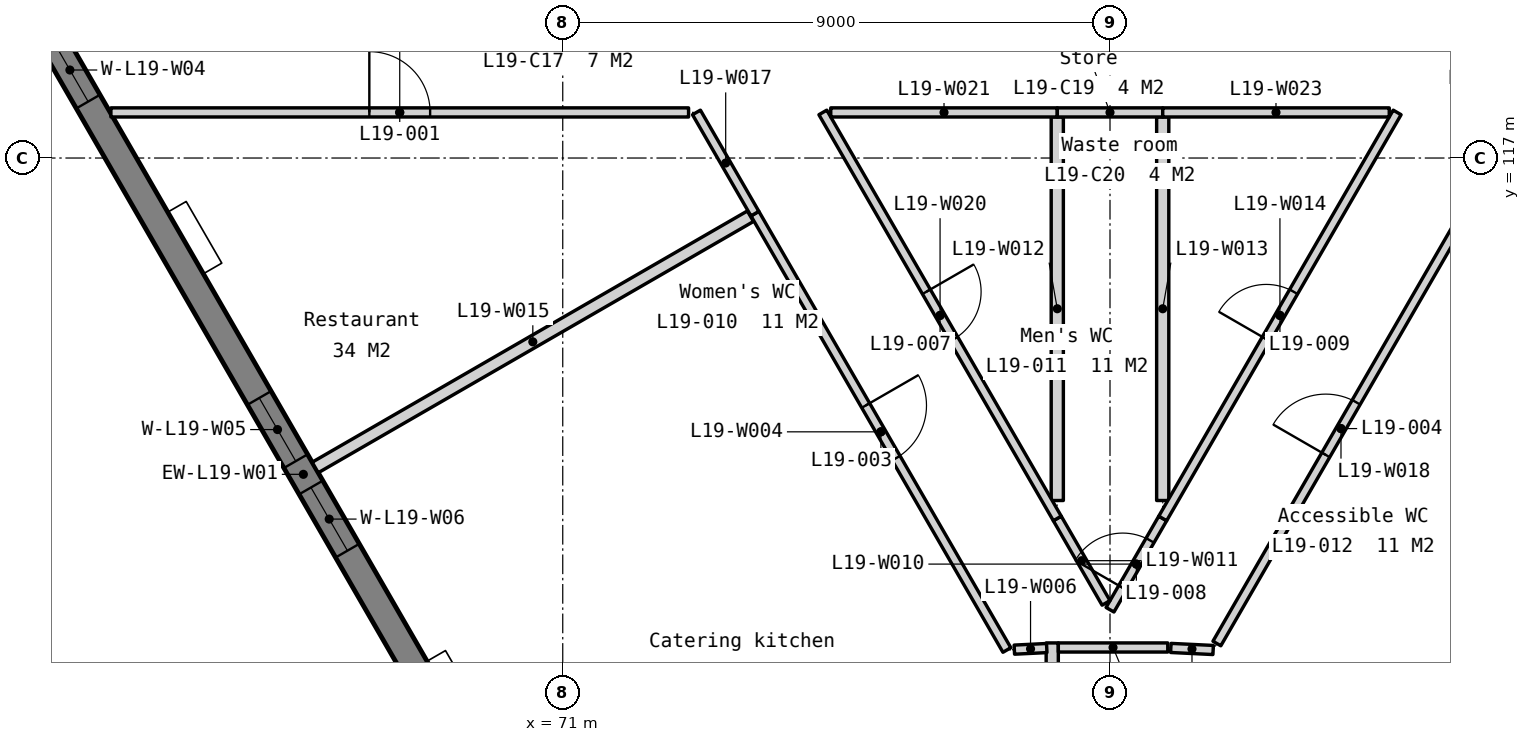
"""IFC4 building model, lengths in metres.
Left out: names, types, materials, properties, quantities, classifications, styles, units other than length and angle.
Written with IfcOpenShell. Run it as: python <this file> out.ifc"""

import sys

from ifc_helpers import new_model, si_unit, direction, frame, frame_2d, origin, place, context, subcontext, project, spatial, polyline, rectangle, outline, extrude, element, fill, save


model = new_model("IFC4")
c1 = context("Model", 3, precision=1e-05, world=origin(), true_north=direction((0.0, 1.0)))
c2 = subcontext(c1, "Body", "Model", "MODEL_VIEW")
j1 = project(units=[si_unit("LENGTHUNIT", "METRE"), si_unit("PLANEANGLEUNIT", "RADIAN")], contexts=[c1])
p1 = place(None, origin())
s1 = spatial("IfcSite", under=j1, at=p1, CompositionType="ELEMENT")
p2 = place(p1, origin())
s2 = spatial("IfcBuilding", under=s1, at=p2, CompositionType="ELEMENT")
p3 = place(p2, frame((0.0, 0.0, 81.8)))
s3 = spatial("IfcBuildingStorey", under=s2, at=p3, CompositionType="ELEMENT", Elevation=81.8)
p4 = place(p3, frame((56.073, 130.263, -0.45), z_axis=(0.0, 0.0, 1.0), x_axis=(0.500000478905, -0.866025127289, 0.0)))
e1 = element("IfcWall", 1, at=p4, inside=s3, PredefinedType="SOLIDWALL", context=c2, shape_type="SweptSolid", body=[
    extrude(outline(polyline([(42.643, 0.0), (42.643, 3.8), (0.0, 3.8), (0.0, 0.0), (42.643, 0.0)])), frame((0.0, 0.225, 0.0), z_axis=(0.0, -1.0, 0.0), x_axis=(1.0, 0.0, 0.0)), (0.0, 0.0, 1.0), 0.45),
])
p5 = place(p4, frame((2.814, 0.0, 1.35)))
e2 = element("IfcOpeningElement", 2, at=p5, cuts=e1, PredefinedType="OPENING", context=c2, shape_type="SweptSolid", body=[
    extrude(rectangle(XDim=1.2, YDim=1.5, at=frame_2d((0.6, 0.75))), frame((0.0, 0.235, 0.0), z_axis=(0.0, -1.0, 0.0), x_axis=(1.0, 0.0, 0.0)), (0.0, 0.0, 1.0), 0.47),
])
p6 = place(p4, frame((4.514, 0.0, 1.35)))
e3 = element("IfcOpeningElement", 3, at=p6, cuts=e1, PredefinedType="OPENING", context=c2, shape_type="SweptSolid", body=[
    extrude(rectangle(XDim=1.2, YDim=1.5, at=frame_2d((0.6, 0.75))), frame((0.0, 0.235, 0.0), z_axis=(0.0, -1.0, 0.0), x_axis=(1.0, 0.0, 0.0)), (0.0, 0.0, 1.0), 0.47),
])
p7 = place(p4, frame((11.343, 0.0, 1.35)))
e4 = element("IfcOpeningElement", 4, at=p7, cuts=e1, PredefinedType="OPENING", context=c2, shape_type="SweptSolid", body=[
    extrude(rectangle(XDim=1.2, YDim=1.5, at=frame_2d((0.6, 0.75))), frame((0.0, 0.235, 0.0), z_axis=(0.0, -1.0, 0.0), x_axis=(1.0, 0.0, 0.0)), (0.0, 0.0, 1.0), 0.47),
])
p8 = place(p4, frame((13.043, 0.0, 1.35)))
e5 = element("IfcOpeningElement", 5, at=p8, cuts=e1, PredefinedType="OPENING", context=c2, shape_type="SweptSolid", body=[
    extrude(rectangle(XDim=1.2, YDim=1.5, at=frame_2d((0.6, 0.75))), frame((0.0, 0.235, 0.0), z_axis=(0.0, -1.0, 0.0), x_axis=(1.0, 0.0, 0.0)), (0.0, 0.0, 1.0), 0.47),
])
p9 = place(p4, frame((19.872, 0.0, 1.35)))
e6 = element("IfcOpeningElement", 6, at=p9, cuts=e1, PredefinedType="OPENING", context=c2, shape_type="SweptSolid", body=[
    extrude(rectangle(XDim=1.2, YDim=1.5, at=frame_2d((0.6, 0.75))), frame((0.0, 0.235, 0.0), z_axis=(0.0, -1.0, 0.0), x_axis=(1.0, 0.0, 0.0)), (0.0, 0.0, 1.0), 0.47),
])
p10 = place(p4, frame((21.572, 0.0, 1.35)))
e7 = element("IfcOpeningElement", 7, at=p10, cuts=e1, PredefinedType="OPENING", context=c2, shape_type="SweptSolid", body=[
    extrude(rectangle(XDim=1.2, YDim=1.5, at=frame_2d((0.6, 0.75))), frame((0.0, 0.235, 0.0), z_axis=(0.0, -1.0, 0.0), x_axis=(1.0, 0.0, 0.0)), (0.0, 0.0, 1.0), 0.47),
])
p11 = place(p4, frame((28.4, 0.0, 1.35)))
e8 = element("IfcOpeningElement", 8, at=p11, cuts=e1, PredefinedType="OPENING", context=c2, shape_type="SweptSolid", body=[
    extrude(rectangle(XDim=1.2, YDim=1.5, at=frame_2d((0.6, 0.75))), frame((0.0, 0.235, 0.0), z_axis=(0.0, -1.0, 0.0), x_axis=(1.0, 0.0, 0.0)), (0.0, 0.0, 1.0), 0.47),
])
p12 = place(p4, frame((30.1, 0.0, 1.35)))
e9 = element("IfcOpeningElement", 9, at=p12, cuts=e1, PredefinedType="OPENING", context=c2, shape_type="SweptSolid", body=[
    extrude(rectangle(XDim=1.2, YDim=1.5, at=frame_2d((0.6, 0.75))), frame((0.0, 0.235, 0.0), z_axis=(0.0, -1.0, 0.0), x_axis=(1.0, 0.0, 0.0)), (0.0, 0.0, 1.0), 0.47),
])
p13 = place(p4, frame((36.929, 0.0, 1.35)))
e10 = element("IfcOpeningElement", 10, at=p13, cuts=e1, PredefinedType="OPENING", context=c2, shape_type="SweptSolid", body=[
    extrude(rectangle(XDim=1.2, YDim=1.5, at=frame_2d((0.6, 0.75))), frame((0.0, 0.235, 0.0), z_axis=(0.0, -1.0, 0.0), x_axis=(1.0, 0.0, 0.0)), (0.0, 0.0, 1.0), 0.47),
])
p14 = place(p4, frame((38.629, 0.0, 1.35)))
e11 = element("IfcOpeningElement", 11, at=p14, cuts=e1, PredefinedType="OPENING", context=c2, shape_type="SweptSolid", body=[
    extrude(rectangle(XDim=1.2, YDim=1.5, at=frame_2d((0.6, 0.75))), frame((0.0, 0.235, 0.0), z_axis=(0.0, -1.0, 0.0), x_axis=(1.0, 0.0, 0.0)), (0.0, 0.0, 1.0), 0.47),
])
p15 = place(p3, frame((82.605, 93.333, -0.45), z_axis=(0.0, 0.0, 1.0), x_axis=(0.500000478905, 0.866025127289, 0.0)))
e12 = element("IfcWall", 12, at=p15, inside=s3, PredefinedType="SOLIDWALL", context=c2, shape_type="SweptSolid", body=[
    extrude(outline(polyline([(42.643, 0.0), (42.643, 3.8), (0.0, 3.8), (0.0, 0.0), (42.643, 0.0)])), frame((0.0, 0.225, 0.0), z_axis=(0.0, -1.0, 0.0), x_axis=(1.0, 0.0, 0.0)), (0.0, 0.0, 1.0), 0.45),
])
p16 = place(p15, frame((2.814, 0.0, 1.35)))
e13 = element("IfcOpeningElement", 13, at=p16, cuts=e12, PredefinedType="OPENING", context=c2, shape_type="SweptSolid", body=[
    extrude(rectangle(XDim=1.2, YDim=1.5, at=frame_2d((0.6, 0.75))), frame((0.0, 0.235, 0.0), z_axis=(0.0, -1.0, 0.0), x_axis=(1.0, 0.0, 0.0)), (0.0, 0.0, 1.0), 0.47),
])
p17 = place(p15, frame((4.514, 0.0, 1.35)))
e14 = element("IfcOpeningElement", 14, at=p17, cuts=e12, PredefinedType="OPENING", context=c2, shape_type="SweptSolid", body=[
    extrude(rectangle(XDim=1.2, YDim=1.5, at=frame_2d((0.6, 0.75))), frame((0.0, 0.235, 0.0), z_axis=(0.0, -1.0, 0.0), x_axis=(1.0, 0.0, 0.0)), (0.0, 0.0, 1.0), 0.47),
])
p18 = place(p15, frame((11.343, 0.0, 1.35)))
e15 = element("IfcOpeningElement", 15, at=p18, cuts=e12, PredefinedType="OPENING", context=c2, shape_type="SweptSolid", body=[
    extrude(rectangle(XDim=1.2, YDim=1.5, at=frame_2d((0.6, 0.75))), frame((0.0, 0.235, 0.0), z_axis=(0.0, -1.0, 0.0), x_axis=(1.0, 0.0, 0.0)), (0.0, 0.0, 1.0), 0.47),
])
p19 = place(p15, frame((13.043, 0.0, 1.35)))
e16 = element("IfcOpeningElement", 16, at=p19, cuts=e12, PredefinedType="OPENING", context=c2, shape_type="SweptSolid", body=[
    extrude(rectangle(XDim=1.2, YDim=1.5, at=frame_2d((0.6, 0.75))), frame((0.0, 0.235, 0.0), z_axis=(0.0, -1.0, 0.0), x_axis=(1.0, 0.0, 0.0)), (0.0, 0.0, 1.0), 0.47),
])
p20 = place(p15, frame((19.872, 0.0, 1.35)))
e17 = element("IfcOpeningElement", 17, at=p20, cuts=e12, PredefinedType="OPENING", context=c2, shape_type="SweptSolid", body=[
    extrude(rectangle(XDim=1.2, YDim=1.5, at=frame_2d((0.6, 0.75))), frame((0.0, 0.235, 0.0), z_axis=(0.0, -1.0, 0.0), x_axis=(1.0, 0.0, 0.0)), (0.0, 0.0, 1.0), 0.47),
])
p21 = place(p15, frame((21.572, 0.0, 1.35)))
e18 = element("IfcOpeningElement", 18, at=p21, cuts=e12, PredefinedType="OPENING", context=c2, shape_type="SweptSolid", body=[
    extrude(rectangle(XDim=1.2, YDim=1.5, at=frame_2d((0.6, 0.75))), frame((0.0, 0.235, 0.0), z_axis=(0.0, -1.0, 0.0), x_axis=(1.0, 0.0, 0.0)), (0.0, 0.0, 1.0), 0.47),
])
p22 = place(p15, frame((28.4, 0.0, 1.35)))
e19 = element("IfcOpeningElement", 19, at=p22, cuts=e12, PredefinedType="OPENING", context=c2, shape_type="SweptSolid", body=[
    extrude(rectangle(XDim=1.2, YDim=1.5, at=frame_2d((0.6, 0.75))), frame((0.0, 0.235, 0.0), z_axis=(0.0, -1.0, 0.0), x_axis=(1.0, 0.0, 0.0)), (0.0, 0.0, 1.0), 0.47),
])
p23 = place(p15, frame((30.1, 0.0, 1.35)))
e20 = element("IfcOpeningElement", 20, at=p23, cuts=e12, PredefinedType="OPENING", context=c2, shape_type="SweptSolid", body=[
    extrude(rectangle(XDim=1.2, YDim=1.5, at=frame_2d((0.6, 0.75))), frame((0.0, 0.235, 0.0), z_axis=(0.0, -1.0, 0.0), x_axis=(1.0, 0.0, 0.0)), (0.0, 0.0, 1.0), 0.47),
])
p24 = place(p15, frame((36.929, 0.0, 1.35)))
e21 = element("IfcOpeningElement", 21, at=p24, cuts=e12, PredefinedType="OPENING", context=c2, shape_type="SweptSolid", body=[
    extrude(rectangle(XDim=1.2, YDim=1.5, at=frame_2d((0.6, 0.75))), frame((0.0, 0.235, 0.0), z_axis=(0.0, -1.0, 0.0), x_axis=(1.0, 0.0, 0.0)), (0.0, 0.0, 1.0), 0.47),
])
p25 = place(p15, frame((38.629, 0.0, 1.35)))
e22 = element("IfcOpeningElement", 22, at=p25, cuts=e12, PredefinedType="OPENING", context=c2, shape_type="SweptSolid", body=[
    extrude(rectangle(XDim=1.2, YDim=1.5, at=frame_2d((0.6, 0.75))), frame((0.0, 0.235, 0.0), z_axis=(0.0, -1.0, 0.0), x_axis=(1.0, 0.0, 0.0)), (0.0, 0.0, 1.0), 0.47),
])
p26 = place(p3, frame((79.05, 107.989, 0.0), z_axis=(0.0, 0.0, 1.0), x_axis=(0.0, 1.0, 0.0)))
e23 = element("IfcWall", 23, at=p26, inside=s3, PredefinedType="PARTITIONING", context=c2, shape_type="SweptSolid", body=[
    extrude(rectangle(XDim=1.036, YDim=0.2, at=frame_2d((0.518, 0.0))), origin(), (0.0, 0.0, 1.0), 3.35),
])
p27 = place(p3, frame((74.16, 116.085, 0.0), z_axis=(0.0, 0.0, 1.0), x_axis=(0.500048861501, -0.865997191746, 0.0)))
e24 = element("IfcWall", 24, at=p27, inside=s3, PredefinedType="PARTITIONING", context=c2, shape_type="SweptSolid", body=[
    extrude(rectangle(XDim=8.287, YDim=0.15, at=frame_2d((4.144, 0.0))), origin(), (0.0, 0.0, 1.0), 3.35),
])
p28 = place(p27, frame((3.644, 0.0, 0.0)))
e25 = element("IfcOpeningElement", 25, at=p28, cuts=e24, PredefinedType="OPENING", context=c2, shape_type="SweptSolid", body=[
    extrude(rectangle(XDim=1.0, YDim=2.1, at=frame_2d((0.5, 1.05))), frame((0.0, 0.085, 0.0), z_axis=(0.0, -1.0, 0.0), x_axis=(1.0, 0.0, 0.0)), (0.0, 0.0, 1.0), 0.17),
])
p29 = place(p3, frame((81.0, 108.943, 0.0), z_axis=(0.0, 0.0, 1.0), x_axis=(0.998813598292, -0.048696980064, 0.0)))
e26 = element("IfcWall", 26, at=p29, inside=s3, PredefinedType="PARTITIONING", context=c2, shape_type="SweptSolid", body=[
    extrude(rectangle(XDim=0.697, YDim=0.15, at=frame_2d((0.348, 0.0))), origin(), (0.0, 0.0, 1.0), 3.35),
])
p30 = place(p3, frame((78.427, 108.914, 0.0), z_axis=(0.0, 0.0, 1.0), x_axis=(0.998778443094, 0.049412767684, 0.0)))
e27 = element("IfcWall", 27, at=p30, inside=s3, PredefinedType="PARTITIONING", context=c2, shape_type="SweptSolid", body=[
    extrude(rectangle(XDim=0.534, YDim=0.15, at=frame_2d((0.267, 0.0))), origin(), (0.0, 0.0, 1.0), 3.35),
])
p31 = place(p3, frame((79.15, 108.95, 0.0), z_axis=(0.0, 0.0, 1.0), x_axis=(1.0, 0.0, 0.0)))
e28 = element("IfcWall", 28, at=p31, inside=s3, PredefinedType="PARTITIONING", context=c2, shape_type="SweptSolid", body=[
    extrude(rectangle(XDim=1.8, YDim=0.15, at=frame_2d((0.9, 0.0))), origin(), (0.0, 0.0, 1.0), 3.35),
])
p32 = place(p3, frame((80.0, 109.571, 0.0), z_axis=(0.0, 0.0, 1.0), x_axis=(0.49997027332, 0.866042565811, 0.0)))
e29 = element("IfcWall", 29, at=p32, inside=s3, PredefinedType="PARTITIONING", context=c2, shape_type="SweptSolid", body=[
    extrude(rectangle(XDim=1.734, YDim=0.15, at=frame_2d((0.867, 0.0))), origin(), (0.0, 0.0, 1.0), 3.35),
])
p33 = place(p32, frame((0.417, 0.0, 0.0)))
e30 = element("IfcOpeningElement", 30, at=p33, cuts=e29, PredefinedType="OPENING", context=c2, shape_type="SweptSolid", body=[
    extrude(rectangle(XDim=0.9, YDim=2.1, at=frame_2d((0.45, 1.05))), frame((0.0, 0.085, 0.0), z_axis=(0.0, -1.0, 0.0), x_axis=(1.0, 0.0, 0.0)), (0.0, 0.0, 1.0), 0.17),
])
p34 = place(p3, frame((79.133, 111.072, 0.0), z_axis=(0.0, 0.0, 1.0), x_axis=(0.499985955615, -0.866033512162, 0.0)))
e31 = element("IfcWall", 31, at=p34, inside=s3, PredefinedType="PARTITIONING", context=c2, shape_type="SweptSolid", body=[
    extrude(rectangle(XDim=1.604, YDim=0.15, at=frame_2d((0.802, 0.0))), origin(), (0.0, 0.0, 1.0), 3.35),
])
for number, where, z_axis, x_axis in (
    (32, (79.133, 111.367, 0.0), (0.0, 0.0, 1.0), (0.0, 1.0, 0.0)),
    (33, (80.867, 111.367, 0.0), (0.0, 0.0, 1.0), (0.0, 1.0, 0.0)),
):
    element("IfcWall", number, at=place(p3, frame(where, z_axis=z_axis, x_axis=x_axis)), inside=s3, PredefinedType="PARTITIONING", context=c2, shape_type="SweptSolid", body=[
        extrude(rectangle(XDim=6.308, YDim=0.2, at=frame_2d((3.154, 0.0))), origin(), (0.0, 0.0, 1.0), 3.35),
    ])
p35 = place(p3, frame((80.867, 111.072, 0.0), z_axis=(0.0, 0.0, 1.0), x_axis=(0.500007490527, 0.866021079084, 0.0)))
e34 = element("IfcWall", 34, at=p35, inside=s3, PredefinedType="PARTITIONING", context=c2, shape_type="SweptSolid", body=[
    extrude(rectangle(XDim=7.711, YDim=0.15, at=frame_2d((3.855, 0.0))), origin(), (0.0, 0.0, 1.0), 3.35),
])
p36 = place(p35, frame((3.406, 0.0, 0.0)))
e35 = element("IfcOpeningElement", 35, at=p36, cuts=e34, PredefinedType="OPENING", context=c2, shape_type="SweptSolid", body=[
    extrude(rectangle(XDim=0.9, YDim=2.1, at=frame_2d((0.45, 1.05))), frame((0.0, 0.085, 0.0), z_axis=(0.0, -1.0, 0.0), x_axis=(1.0, 0.0, 0.0)), (0.0, 0.0, 1.0), 0.17),
])
p37 = place(p3, frame((66.929, 111.91, 0.0), z_axis=(0.0, 0.0, 1.0), x_axis=(0.866022272496, 0.500005423512, 0.0)))
e36 = element("IfcWall", 36, at=p37, inside=s3, PredefinedType="PARTITIONING", context=c2, shape_type="SweptSolid", body=[
    extrude(rectangle(XDim=8.265, YDim=0.2, at=frame_2d((4.133, 0.0))), origin(), (0.0, 0.0, 1.0), 3.35),
])
p38 = place(p3, frame((73.199, 117.75, 0.0), z_axis=(0.0, 0.0, 1.0), x_axis=(0.499909361484, -0.866077727632, 0.0)))
e37 = element("IfcWall", 37, at=p38, inside=s3, PredefinedType="PARTITIONING", context=c2, shape_type="SweptSolid", body=[
    extrude(rectangle(XDim=1.922, YDim=0.15, at=frame_2d((0.961, 0.0))), origin(), (0.0, 0.0, 1.0), 3.35),
])
p39 = place(p3, frame((81.758, 109.015, 0.0), z_axis=(0.0, 0.0, 1.0), x_axis=(0.50001151834, 0.866018753565, 0.0)))
e38 = element("IfcWall", 38, at=p39, inside=s3, PredefinedType="PARTITIONING", context=c2, shape_type="SweptSolid", body=[
    extrude(rectangle(XDim=8.164, YDim=0.15, at=frame_2d((4.082, 0.0))), origin(), (0.0, 0.0, 1.0), 3.35),
])
p40 = place(p39, frame((3.582, 0.0, 0.0)))
e39 = element("IfcOpeningElement", 39, at=p40, cuts=e38, PredefinedType="OPENING", context=c2, shape_type="SweptSolid", body=[
    extrude(rectangle(XDim=1.0, YDim=2.1, at=frame_2d((0.5, 1.05))), frame((0.0, 0.085, 0.0), z_axis=(0.0, -1.0, 0.0), x_axis=(1.0, 0.0, 0.0)), (0.0, 0.0, 1.0), 0.17),
])
p41 = place(p3, frame((63.569, 117.75, 0.0), z_axis=(0.0, 0.0, 1.0), x_axis=(1.0, 0.0, 0.0)))
e40 = element("IfcWall", 40, at=p41, inside=s3, PredefinedType="PARTITIONING", context=c2, shape_type="SweptSolid", body=[
    extrude(rectangle(XDim=9.5, YDim=0.15, at=frame_2d((4.75, 0.0))), origin(), (0.0, 0.0, 1.0), 3.35),
])
p42 = place(p41, frame((4.25, 0.0, 0.0)))
e41 = element("IfcOpeningElement", 41, at=p42, cuts=e40, PredefinedType="OPENING", context=c2, shape_type="SweptSolid", body=[
    extrude(rectangle(XDim=1.0, YDim=2.1, at=frame_2d((0.5, 1.05))), frame((0.0, 0.085, 0.0), z_axis=(0.0, -1.0, 0.0), x_axis=(1.0, 0.0, 0.0)), (0.0, 0.0, 1.0), 0.17),
])
p43 = place(p3, frame((75.278, 117.75, 0.0), z_axis=(0.0, 0.0, 1.0), x_axis=(0.500007490527, -0.866021079084, 0.0)))
e42 = element("IfcWall", 42, at=p43, inside=s3, PredefinedType="PARTITIONING", context=c2, shape_type="SweptSolid", body=[
    extrude(rectangle(XDim=7.711, YDim=0.15, at=frame_2d((3.855, 0.0))), origin(), (0.0, 0.0, 1.0), 3.35),
])
p44 = place(p43, frame((3.406, 0.0, 0.0)))
e43 = element("IfcOpeningElement", 43, at=p44, cuts=e42, PredefinedType="OPENING", context=c2, shape_type="SweptSolid", body=[
    extrude(rectangle(XDim=0.9, YDim=2.1, at=frame_2d((0.45, 1.05))), frame((0.0, 0.085, 0.0), z_axis=(0.0, -1.0, 0.0), x_axis=(1.0, 0.0, 0.0)), (0.0, 0.0, 1.0), 0.17),
])
p45 = place(p3, frame((75.407, 117.75, 0.0), z_axis=(0.0, 0.0, 1.0), x_axis=(1.0, 0.0, 0.0)))
e44 = element("IfcWall", 44, at=p45, inside=s3, PredefinedType="PARTITIONING", context=c2, shape_type="SweptSolid", body=[
    extrude(rectangle(XDim=3.726, YDim=0.15, at=frame_2d((1.863, 0.0))), origin(), (0.0, 0.0, 1.0), 3.35),
])
p46 = place(p3, frame((79.133, 117.75, 0.0), z_axis=(0.0, 0.0, 1.0), x_axis=(1.0, 0.0, 0.0)))
e45 = element("IfcWall", 45, at=p46, inside=s3, PredefinedType="PARTITIONING", context=c2, shape_type="SweptSolid", body=[
    extrude(rectangle(XDim=1.734, YDim=0.15, at=frame_2d((0.867, 0.0))), origin(), (0.0, 0.0, 1.0), 3.35),
])
p47 = place(p3, frame((80.867, 117.75, 0.0), z_axis=(0.0, 0.0, 1.0), x_axis=(1.0, 0.0, 0.0)))
e46 = element("IfcWall", 46, at=p47, inside=s3, PredefinedType="PARTITIONING", context=c2, shape_type="SweptSolid", body=[
    extrude(rectangle(XDim=3.726, YDim=0.15, at=frame_2d((1.863, 0.0))), origin(), (0.0, 0.0, 1.0), 3.35),
])
p48 = place(p8, origin())
e47 = element("IfcWindow", 47, at=p48, inside=s3, PartitioningType="SINGLE_PANEL", PredefinedType="WINDOW", context=c2, shape_type="SweptSolid", body=[
    extrude(rectangle(XDim=1.2, YDim=1.5, at=frame_2d((0.6, 0.75))), frame((0.0, 0.03, 0.0), z_axis=(0.0, -1.0, 0.0), x_axis=(1.0, 0.0, 0.0)), (0.0, 0.0, 1.0), 0.06),
])
fill(e5, e47)
p49 = place(p9, origin())
e48 = element("IfcWindow", 48, at=p49, inside=s3, PartitioningType="SINGLE_PANEL", PredefinedType="WINDOW", context=c2, shape_type="SweptSolid", body=[
    extrude(rectangle(XDim=1.2, YDim=1.5, at=frame_2d((0.6, 0.75))), frame((0.0, 0.03, 0.0), z_axis=(0.0, -1.0, 0.0), x_axis=(1.0, 0.0, 0.0)), (0.0, 0.0, 1.0), 0.06),
])
fill(e6, e48)
p50 = place(p10, origin())
e49 = element("IfcWindow", 49, at=p50, inside=s3, PartitioningType="SINGLE_PANEL", PredefinedType="WINDOW", context=c2, shape_type="SweptSolid", body=[
    extrude(rectangle(XDim=1.2, YDim=1.5, at=frame_2d((0.6, 0.75))), frame((0.0, 0.03, 0.0), z_axis=(0.0, -1.0, 0.0), x_axis=(1.0, 0.0, 0.0)), (0.0, 0.0, 1.0), 0.06),
])
fill(e7, e49)
p51 = place(p42, origin())
e50 = element("IfcDoor", 50, at=p51, inside=s3, OperationType="SINGLE_SWING_LEFT", PredefinedType="DOOR", context=c2, shape_type="SweptSolid", body=[
    extrude(rectangle(XDim=1.0, YDim=2.1, at=frame_2d((0.5, 1.05))), frame((0.0, 0.025, 0.0), z_axis=(0.0, -1.0, 0.0), x_axis=(1.0, 0.0, 0.0)), (0.0, 0.0, 1.0), 0.05),
])
fill(e41, e50)
p52 = place(p28, origin())
e51 = element("IfcDoor", 51, at=p52, inside=s3, OperationType="SINGLE_SWING_LEFT", PredefinedType="DOOR", context=c2, shape_type="SweptSolid", body=[
    extrude(rectangle(XDim=1.0, YDim=2.1, at=frame_2d((0.5, 1.05))), frame((0.0, 0.025, 0.0), z_axis=(0.0, -1.0, 0.0), x_axis=(1.0, 0.0, 0.0)), (0.0, 0.0, 1.0), 0.05),
])
fill(e25, e51)
p53 = place(p40, origin())
e52 = element("IfcDoor", 52, at=p53, inside=s3, OperationType="SINGLE_SWING_LEFT", PredefinedType="DOOR", context=c2, shape_type="SweptSolid", body=[
    extrude(rectangle(XDim=1.0, YDim=2.1, at=frame_2d((0.5, 1.05))), frame((0.0, 0.025, 0.0), z_axis=(0.0, -1.0, 0.0), x_axis=(1.0, 0.0, 0.0)), (0.0, 0.0, 1.0), 0.05),
])
fill(e39, e52)
p54 = place(p44, origin())
e53 = element("IfcDoor", 53, at=p54, inside=s3, OperationType="SINGLE_SWING_LEFT", PredefinedType="DOOR", context=c2, shape_type="SweptSolid", body=[
    extrude(rectangle(XDim=0.9, YDim=2.1, at=frame_2d((0.45, 1.05))), frame((0.0, 0.025, 0.0), z_axis=(0.0, -1.0, 0.0), x_axis=(1.0, 0.0, 0.0)), (0.0, 0.0, 1.0), 0.05),
])
fill(e43, e53)
p55 = place(p33, origin())
e54 = element("IfcDoor", 54, at=p55, inside=s3, OperationType="SINGLE_SWING_LEFT", PredefinedType="DOOR", context=c2, shape_type="SweptSolid", body=[
    extrude(rectangle(XDim=0.9, YDim=2.1, at=frame_2d((0.45, 1.05))), frame((0.0, 0.025, 0.0), z_axis=(0.0, -1.0, 0.0), x_axis=(1.0, 0.0, 0.0)), (0.0, 0.0, 1.0), 0.05),
])
fill(e30, e54)
p56 = place(p36, origin())
e55 = element("IfcDoor", 55, at=p56, inside=s3, OperationType="SINGLE_SWING_LEFT", PredefinedType="DOOR", context=c2, shape_type="SweptSolid", body=[
    extrude(rectangle(XDim=0.9, YDim=2.1, at=frame_2d((0.45, 1.05))), frame((0.0, 0.025, 0.0), z_axis=(0.0, -1.0, 0.0), x_axis=(1.0, 0.0, 0.0)), (0.0, 0.0, 1.0), 0.05),
])
fill(e35, e55)
save(model, sys.argv[1])
